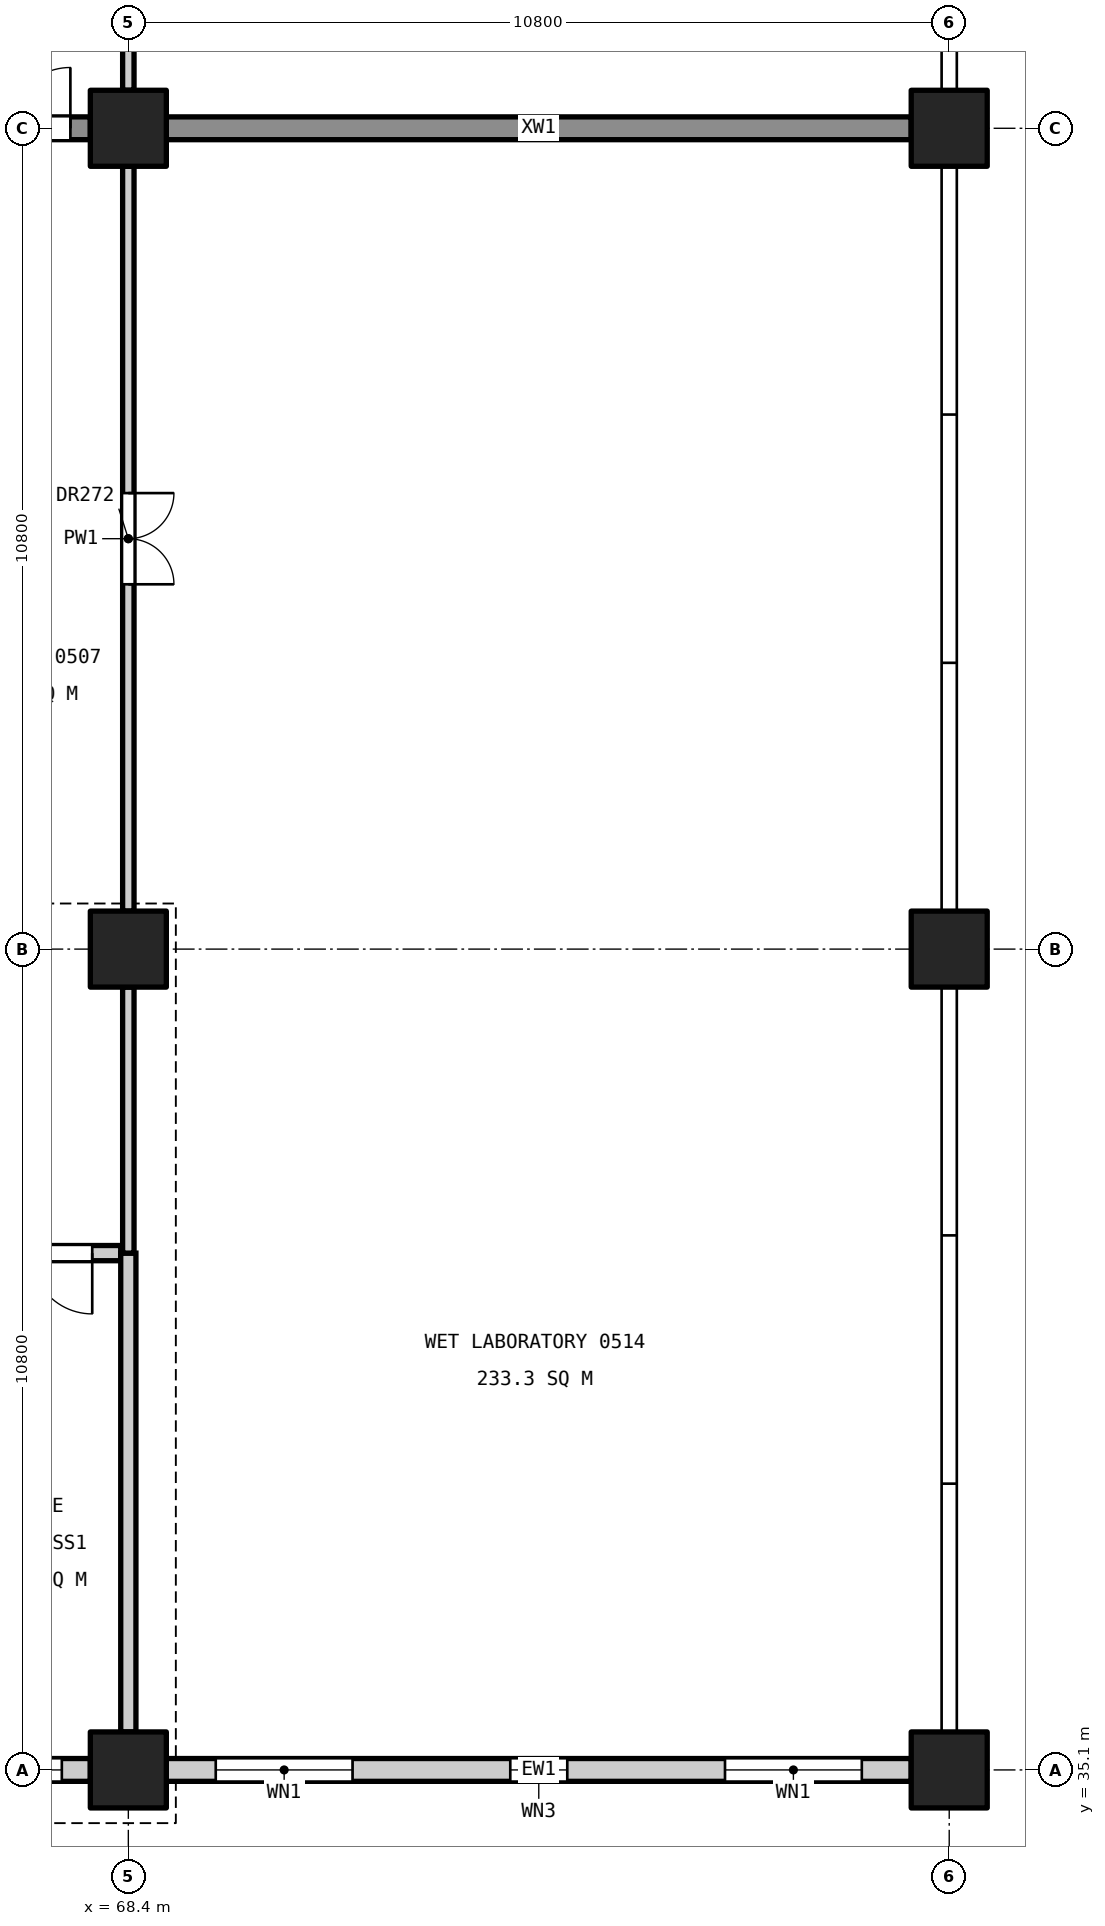
"""IFC4 building model, lengths in metres.
Left out: names, types, materials, properties, quantities, classifications, styles, units other than length and angle.
Written with IfcOpenShell. Run it as: python <this file> out.ifc"""

import sys

from ifc_helpers import new_model, si_unit, direction, frame, frame_2d, origin, origin_2d, place, context, subcontext, project, spatial, rectangle, extrude, element, fill, save


model = new_model("IFC4")
c1 = context("Model", 3, precision=1e-05, world=origin(), true_north=direction((0.0, 1.0)))
c2 = subcontext(c1, "Body", "Model", "MODEL_VIEW")
j1 = project(units=[si_unit("LENGTHUNIT", "METRE"), si_unit("PLANEANGLEUNIT", "RADIAN")], contexts=[c1])
p1 = place(None, origin())
s1 = spatial("IfcSite", under=j1, at=p1, CompositionType="ELEMENT")
p2 = place(p1, origin())
s2 = spatial("IfcBuilding", under=s1, at=p2, CompositionType="ELEMENT")
p3 = place(p2, frame((0.0, 0.0, 27.0)))
s3 = spatial("IfcBuildingStorey", under=s2, at=p3, CompositionType="ELEMENT", Elevation=27.0)
for number, where, z_axis, x_axis in (
    (1, (68.4, 35.1, 0.0), (0.0, 0.0, 1.0), (1.0, 0.0, 0.0)),
    (2, (68.4, 45.9, 0.0), (0.0, 0.0, 1.0), (1.0, 0.0, 0.0)),
    (3, (68.4, 56.7, 0.0), (0.0, 0.0, 1.0), (1.0, 0.0, 0.0)),
    (4, (79.2, 35.1, 0.0), (0.0, 0.0, 1.0), (1.0, 0.0, 0.0)),
    (5, (79.2, 45.9, 0.0), (0.0, 0.0, 1.0), (1.0, 0.0, 0.0)),
    (6, (79.2, 56.7, 0.0), (0.0, 0.0, 1.0), (1.0, 0.0, 0.0)),
):
    element("IfcColumn", number, at=place(p3, frame(where, z_axis=z_axis, x_axis=x_axis)), inside=s3, PredefinedType="COLUMN", context=c2, shape_type="SweptSolid", body=[
        extrude(rectangle(XDim=1.0, YDim=1.0, at=origin_2d()), origin(), (0.0, 0.0, 1.0), 4.8),
    ])
p4 = place(p3, frame((61.7, 56.7, 0.0), z_axis=(0.0, 0.0, 1.0), x_axis=(1.0, 0.0, 0.0)))
e7 = element("IfcWall", 7, at=p4, inside=s3, PredefinedType="SHEAR", context=c2, shape_type="SweptSolid", body=[
    extrude(rectangle(XDim=6.2, YDim=0.3, at=frame_2d((3.1, 0.0))), origin(), (0.0, 0.0, 1.0), 4.55),
])
p5 = place(p4, frame((4.337, 0.0, 0.0)))
e8 = element("IfcOpeningElement", 8, at=p5, cuts=e7, PredefinedType="OPENING", context=c2, shape_type="SweptSolid", body=[
    extrude(rectangle(XDim=1.6, YDim=2.1, at=frame_2d((0.8, 1.05))), frame((0.0, 0.16, 0.0), z_axis=(0.0, -1.0, 0.0), x_axis=(1.0, 0.0, 0.0)), (0.0, 0.0, 1.0), 0.32),
])
p6 = place(p3, frame((68.9, 56.7, 0.0), z_axis=(0.0, 0.0, 1.0), x_axis=(1.0, 0.0, 0.0)))
e9 = element("IfcWall", 9, at=p6, inside=s3, PredefinedType="SHEAR", context=c2, shape_type="SweptSolid", body=[
    extrude(rectangle(XDim=9.8, YDim=0.3, at=frame_2d((4.9, 0.0))), origin(), (0.0, 0.0, 1.0), 4.55),
])
p7 = place(p3, frame((65.95, 35.1, 0.0), z_axis=(0.0, 0.0, 1.0), x_axis=(1.0, 0.0, 0.0)))
e10 = element("IfcWall", 10, at=p7, inside=s3, PredefinedType="STANDARD", context=c2, shape_type="SweptSolid", body=[
    extrude(rectangle(XDim=1.95, YDim=0.3, at=frame_2d((0.975, 0.0))), origin(), (0.0, 0.0, 1.0), 3.85),
])
p8 = place(p7, frame((0.375, 0.0, 0.9)))
e11 = element("IfcOpeningElement", 11, at=p8, cuts=e10, PredefinedType="OPENING", context=c2, shape_type="SweptSolid", body=[
    extrude(rectangle(XDim=1.2, YDim=2.4, at=frame_2d((0.6, 1.2))), frame((0.0, 0.16, 0.0), z_axis=(0.0, -1.0, 0.0), x_axis=(1.0, 0.0, 0.0)), (0.0, 0.0, 1.0), 0.32),
])
p9 = place(p3, frame((68.9, 35.1, 0.0), z_axis=(0.0, 0.0, 1.0), x_axis=(1.0, 0.0, 0.0)))
e12 = element("IfcWall", 12, at=p9, inside=s3, PredefinedType="STANDARD", context=c2, shape_type="SweptSolid", body=[
    extrude(rectangle(XDim=9.8, YDim=0.3, at=frame_2d((4.9, 0.0))), origin(), (0.0, 0.0, 1.0), 3.85),
])
p10 = place(p9, frame((0.65, 0.0, 0.9)))
e13 = element("IfcOpeningElement", 13, at=p10, cuts=e12, PredefinedType="OPENING", context=c2, shape_type="SweptSolid", body=[
    extrude(rectangle(XDim=1.8, YDim=2.4, at=frame_2d((0.9, 1.2))), frame((0.0, 0.16, 0.0), z_axis=(0.0, -1.0, 0.0), x_axis=(1.0, 0.0, 0.0)), (0.0, 0.0, 1.0), 0.32),
])
p11 = place(p9, frame((4.525, 0.0, 0.8)))
e14 = element("IfcOpeningElement", 14, at=p11, cuts=e12, PredefinedType="OPENING", context=c2, shape_type="SweptSolid", body=[
    extrude(rectangle(XDim=0.75, YDim=1.2, at=frame_2d((0.375, 0.6))), frame((0.0, 0.16, 0.0), z_axis=(0.0, -1.0, 0.0), x_axis=(1.0, 0.0, 0.0)), (0.0, 0.0, 1.0), 0.32),
])
p12 = place(p9, frame((7.35, 0.0, 0.9)))
e15 = element("IfcOpeningElement", 15, at=p12, cuts=e12, PredefinedType="OPENING", context=c2, shape_type="SweptSolid", body=[
    extrude(rectangle(XDim=1.8, YDim=2.4, at=frame_2d((0.9, 1.2))), frame((0.0, 0.16, 0.0), z_axis=(0.0, -1.0, 0.0), x_axis=(1.0, 0.0, 0.0)), (0.0, 0.0, 1.0), 0.32),
])
p13 = place(p3, frame((65.95, 41.9, 0.0), z_axis=(0.0, 0.0, 1.0), x_axis=(1.0, 0.0, 0.0)))
e16 = element("IfcWall", 16, at=p13, inside=s3, PredefinedType="PARTITIONING", context=c2, shape_type="SweptSolid", body=[
    extrude(rectangle(XDim=2.35, YDim=0.2, at=frame_2d((1.175, 0.0))), origin(), (0.0, 0.0, 1.0), 3.55),
])
p14 = place(p13, frame((0.375, 0.0, 0.0)))
e17 = element("IfcOpeningElement", 17, at=p14, cuts=e16, PredefinedType="OPENING", context=c2, shape_type="SweptSolid", body=[
    extrude(rectangle(XDim=1.6, YDim=2.1, at=frame_2d((0.8, 1.05))), frame((0.0, 0.11, 0.0), z_axis=(0.0, -1.0, 0.0), x_axis=(1.0, 0.0, 0.0)), (0.0, 0.0, 1.0), 0.22),
])
p15 = place(p3, frame((68.4, 35.6, 0.0), z_axis=(0.0, 0.0, 1.0), x_axis=(0.0, 1.0, 0.0)))
e18 = element("IfcWall", 18, at=p15, inside=s3, PredefinedType="PARTITIONING", context=c2, shape_type="SweptSolid", body=[
    extrude(rectangle(XDim=6.3, YDim=0.2, at=frame_2d((3.15, 0.0))), origin(), (0.0, 0.0, 1.0), 3.55),
])
p16 = place(p3, frame((68.4, 41.9, 0.0), z_axis=(0.0, 0.0, 1.0), x_axis=(0.0, 1.0, 0.0)))
e19 = element("IfcWall", 19, at=p16, inside=s3, PredefinedType="PARTITIONING", context=c2, shape_type="SweptSolid", body=[
    extrude(rectangle(XDim=3.5, YDim=0.15, at=frame_2d((1.75, 0.0))), origin(), (0.0, 0.0, 1.0), 3.55),
])
p17 = place(p3, frame((68.4, 46.4, 0.0), z_axis=(0.0, 0.0, 1.0), x_axis=(0.0, 1.0, 0.0)))
e20 = element("IfcWall", 20, at=p17, inside=s3, PredefinedType="PARTITIONING", context=c2, shape_type="SweptSolid", body=[
    extrude(rectangle(XDim=9.8, YDim=0.15, at=frame_2d((4.9, 0.0))), origin(), (0.0, 0.0, 1.0), 3.55),
])
p18 = place(p17, frame((4.3, 0.0, 0.0)))
e21 = element("IfcOpeningElement", 21, at=p18, cuts=e20, PredefinedType="OPENING", context=c2, shape_type="SweptSolid", body=[
    extrude(rectangle(XDim=1.2, YDim=2.1, at=frame_2d((0.6, 1.05))), frame((0.0, 0.085, 0.0), z_axis=(0.0, -1.0, 0.0), x_axis=(1.0, 0.0, 0.0)), (0.0, 0.0, 1.0), 0.17),
])
p19 = place(p3, frame((68.4, 57.2, 0.0), z_axis=(0.0, 0.0, 1.0), x_axis=(0.0, 1.0, 0.0)))
e22 = element("IfcWall", 22, at=p19, inside=s3, PredefinedType="PARTITIONING", context=c2, shape_type="SweptSolid", body=[
    extrude(rectangle(XDim=3.1, YDim=0.15, at=frame_2d((1.55, 0.0))), origin(), (0.0, 0.0, 1.0), 3.55),
])
p20 = place(p8, origin())
e23 = element("IfcWindow", 23, at=p20, inside=s3, PartitioningType="SINGLE_PANEL", PredefinedType="WINDOW", context=c2, shape_type="SweptSolid", body=[
    extrude(rectangle(XDim=1.2, YDim=2.4, at=frame_2d((0.6, 1.2))), frame((0.0, 0.03, 0.0), z_axis=(0.0, -1.0, 0.0), x_axis=(1.0, 0.0, 0.0)), (0.0, 0.0, 1.0), 0.06),
])
fill(e11, e23)
p21 = place(p10, origin())
e24 = element("IfcWindow", 24, at=p21, inside=s3, PartitioningType="SINGLE_PANEL", PredefinedType="WINDOW", context=c2, shape_type="SweptSolid", body=[
    extrude(rectangle(XDim=1.8, YDim=2.4, at=frame_2d((0.9, 1.2))), frame((0.0, 0.03, 0.0), z_axis=(0.0, -1.0, 0.0), x_axis=(1.0, 0.0, 0.0)), (0.0, 0.0, 1.0), 0.06),
])
fill(e13, e24)
p22 = place(p11, origin())
e25 = element("IfcWindow", 25, at=p22, inside=s3, PartitioningType="SINGLE_PANEL", PredefinedType="WINDOW", context=c2, shape_type="SweptSolid", body=[
    extrude(rectangle(XDim=0.75, YDim=1.2, at=frame_2d((0.375, 0.6))), frame((0.0, 0.03, 0.0), z_axis=(0.0, -1.0, 0.0), x_axis=(1.0, 0.0, 0.0)), (0.0, 0.0, 1.0), 0.06),
])
fill(e14, e25)
p23 = place(p12, origin())
e26 = element("IfcWindow", 26, at=p23, inside=s3, PartitioningType="SINGLE_PANEL", PredefinedType="WINDOW", context=c2, shape_type="SweptSolid", body=[
    extrude(rectangle(XDim=1.8, YDim=2.4, at=frame_2d((0.9, 1.2))), frame((0.0, 0.03, 0.0), z_axis=(0.0, -1.0, 0.0), x_axis=(1.0, 0.0, 0.0)), (0.0, 0.0, 1.0), 0.06),
])
fill(e15, e26)
p24 = place(p18, frame((1.2, 0.0, 0.0), z_axis=(0.0, 0.0, 1.0), x_axis=(-1.0, 0.0, 0.0)))
e27 = element("IfcDoor", 27, at=p24, inside=s3, OperationType="DOUBLE_DOOR_SINGLE_SWING", PredefinedType="DOOR", context=c2, shape_type="SweptSolid", body=[
    extrude(rectangle(XDim=1.2, YDim=2.1, at=frame_2d((0.6, 1.05))), frame((0.0, 0.025, 0.0), z_axis=(0.0, -1.0, 0.0), x_axis=(1.0, 0.0, 0.0)), (0.0, 0.0, 1.0), 0.05),
])
fill(e21, e27)
p25 = place(p14, frame((1.6, 0.0, 0.0), z_axis=(0.0, 0.0, 1.0), x_axis=(-1.0, 0.0, 0.0)))
e28 = element("IfcDoor", 28, at=p25, inside=s3, OperationType="DOUBLE_DOOR_SINGLE_SWING", PredefinedType="DOOR", context=c2, shape_type="SweptSolid", body=[
    extrude(rectangle(XDim=1.6, YDim=2.1, at=frame_2d((0.8, 1.05))), frame((0.0, 0.025, 0.0), z_axis=(0.0, -1.0, 0.0), x_axis=(1.0, 0.0, 0.0)), (0.0, 0.0, 1.0), 0.05),
])
fill(e17, e28)
p26 = place(p5, origin())
e29 = element("IfcDoor", 29, at=p26, inside=s3, OperationType="DOUBLE_DOOR_SINGLE_SWING", PredefinedType="DOOR", context=c2, shape_type="SweptSolid", body=[
    extrude(rectangle(XDim=1.6, YDim=2.1, at=frame_2d((0.8, 1.05))), frame((0.0, 0.025, 0.0), z_axis=(0.0, -1.0, 0.0), x_axis=(1.0, 0.0, 0.0)), (0.0, 0.0, 1.0), 0.05),
])
fill(e8, e29)
save(model, sys.argv[1])
